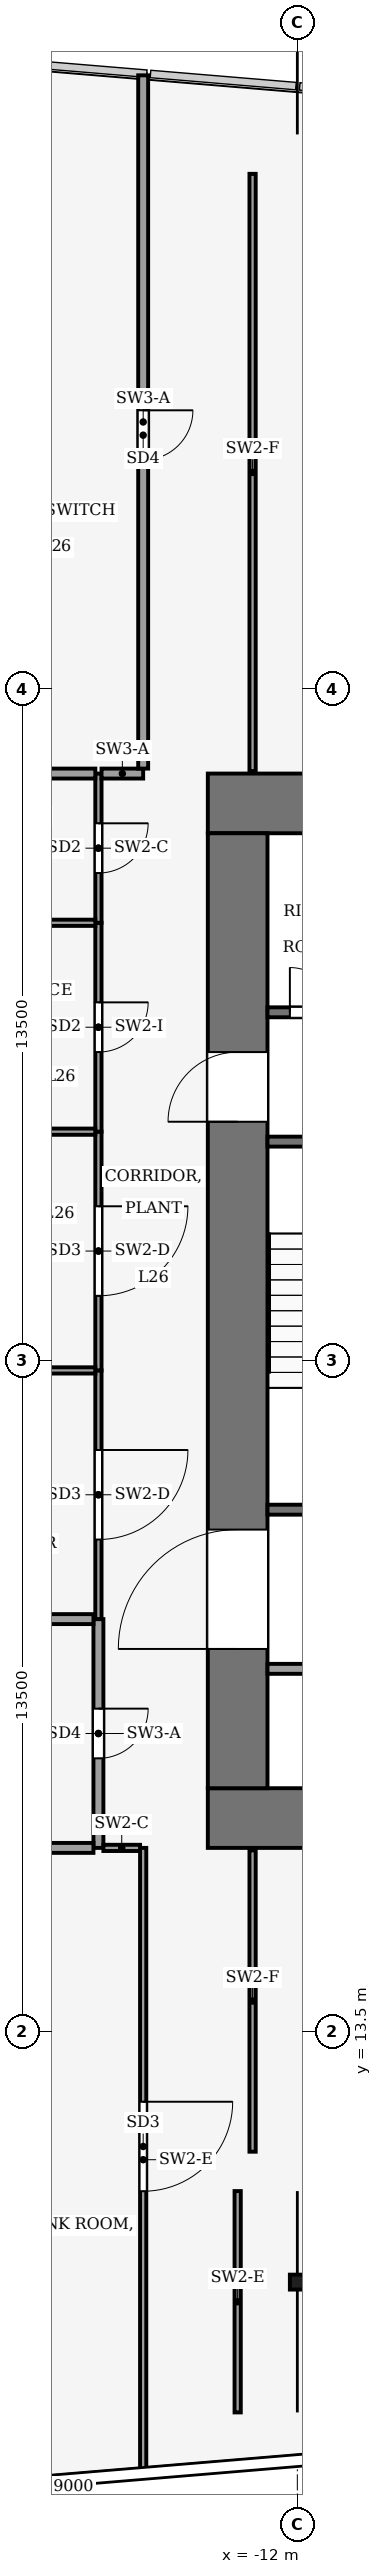
"""IFC4 building model, lengths in metres.
Left out: names, types, materials, properties, quantities, classifications, styles, units other than length and angle.
Written with IfcOpenShell. Run it as: python <this file> out.ifc"""

import sys

from ifc_helpers import new_model, si_unit, direction, frame, frame_2d, origin, origin_2d, place, context, subcontext, project, spatial, rectangle, hollow_rectangle, i_section, extrude, element, fill, save


model = new_model("IFC4")
c1 = context("Model", 3, precision=1e-05, world=origin(), true_north=direction((0.0, 1.0)))
c2 = subcontext(c1, "Body", "Model", "MODEL_VIEW")
j1 = project(units=[si_unit("LENGTHUNIT", "METRE"), si_unit("PLANEANGLEUNIT", "RADIAN")], contexts=[c1])
p1 = place(None, origin())
s1 = spatial("IfcSite", under=j1, at=p1, CompositionType="ELEMENT")
p2 = place(p1, origin())
s2 = spatial("IfcBuilding", under=s1, at=p2, CompositionType="ELEMENT")
p3 = place(p2, frame((0.0, 0.0, 114.0)))
s3 = spatial("IfcBuildingStorey", under=s2, at=p3, CompositionType="ELEMENT", Elevation=114.0)
for number, where, z_axis, x_axis in (
    (1, (-13.8, 17.8, -0.25), (0.0, 0.0, 1.0), (1.0, 0.0, 0.0)),
    (2, (-13.8, 38.2, -0.25), (0.0, 0.0, 1.0), (1.0, 0.0, 0.0)),
):
    element("IfcWall", number, at=place(p3, frame(where, z_axis=z_axis, x_axis=x_axis)), inside=s3, PredefinedType="SHEAR", context=c2, shape_type="SweptSolid", body=[
        extrude(rectangle(XDim=27.6, YDim=1.2, at=frame_2d((13.8, 0.0))), origin(), (0.0, 0.0, 1.0), 7.12),
    ])
p4 = place(p3, frame((-13.2, 18.4, -0.25), z_axis=(0.0, 0.0, 1.0), x_axis=(0.0, 1.0, 0.0)))
e3 = element("IfcWall", 3, at=p4, inside=s3, PredefinedType="SHEAR", context=c2, shape_type="SweptSolid", body=[
    extrude(rectangle(XDim=19.2, YDim=1.2, at=frame_2d((9.6, 0.0))), origin(), (0.0, 0.0, 1.0), 7.12),
])
p5 = place(p4, frame((2.8, 0.0, 0.25)))
e4 = element("IfcOpeningElement", 4, at=p5, cuts=e3, PredefinedType="OPENING", context=c2, shape_type="SweptSolid", body=[
    extrude(rectangle(XDim=2.4, YDim=2.4, at=frame_2d((1.2, 1.2))), frame((0.0, 0.61, 0.0), z_axis=(0.0, -1.0, 0.0), x_axis=(1.0, 0.0, 0.0)), (0.0, 0.0, 1.0), 1.22),
])
p6 = place(p4, frame((13.4, 0.0, 0.25)))
e5 = element("IfcOpeningElement", 5, at=p6, cuts=e3, PredefinedType="OPENING", context=c2, shape_type="SweptSolid", body=[
    extrude(rectangle(XDim=1.4, YDim=2.2, at=frame_2d((0.7, 1.1))), frame((0.0, 0.61, 0.0), z_axis=(0.0, -1.0, 0.0), x_axis=(1.0, 0.0, 0.0)), (0.0, 0.0, 1.0), 1.22),
])
p7 = place(p3, frame((-12.0, 51.65, 0.337), z_axis=(0.0, 0.786264551358, 0.617890002571), x_axis=(-1.0, 0.0, 0.0)))
e6 = element("IfcColumn", 6, at=p7, inside=s3, PredefinedType="COLUMN", context=c2, shape_type="SweptSolid", body=[
    extrude(hollow_rectangle(XDim=0.8, YDim=0.8, WallThickness=0.04, at=origin_2d()), origin(), (0.0, 0.0, 1.0), 10.238),
])
p8 = place(p3, frame((-12.0, 5.85, 0.253), z_axis=(0.0, 0.565283029437, 0.824897021834), x_axis=(-1.0, 0.0, 0.0)))
e7 = element("IfcColumn", 7, at=p8, inside=s3, PredefinedType="COLUMN", context=c2, shape_type="SweptSolid", body=[
    extrude(hollow_rectangle(XDim=0.8, YDim=0.8, WallThickness=0.04, at=origin_2d()), origin(), (0.0, 0.0, 1.0), 7.872),
])
p9 = place(p3, frame((-12.0, 8.47, 5.003), z_axis=(0.0, 0.0, 1.0), x_axis=(1.0, 0.0, 0.0)))
e8 = element("IfcColumn", 8, at=p9, inside=s3, PredefinedType="COLUMN", context=c2, shape_type="SweptSolid", body=[
    extrude(i_section(OverallWidth=0.3, OverallDepth=0.3, WebThickness=0.011, FlangeThickness=0.019, FilletRadius=0.027, at=origin_2d()), origin(), (0.0, 0.0, 1.0), 1.697),
])
p10 = place(p3, frame((-12.6, 20.8, 0.0), z_axis=(0.0, 0.0, 1.0), x_axis=(1.0, 0.0, 0.0)))
e9 = element("IfcWall", 9, at=p10, inside=s3, PredefinedType="PARTITIONING", context=c2, shape_type="SweptSolid", body=[
    extrude(rectangle(XDim=6.6, YDim=0.2, at=frame_2d((3.3, 0.0))), origin(), (0.0, 0.0, 1.0), 6.87),
])
p11 = place(p10, frame((2.8, 0.0, 0.0)))
e10 = element("IfcOpeningElement", 10, at=p11, cuts=e9, PredefinedType="OPENING", context=c2, shape_type="SweptSolid", body=[
    extrude(rectangle(XDim=1.0, YDim=2.1, at=frame_2d((0.5, 1.05))), frame((0.0, 0.11, 0.0), z_axis=(0.0, -1.0, 0.0), x_axis=(1.0, 0.0, 0.0)), (0.0, 0.0, 1.0), 0.22),
])
p12 = place(p3, frame((-12.6, 24.0, 0.0), z_axis=(0.0, 0.0, 1.0), x_axis=(1.0, 0.0, 0.0)))
e11 = element("IfcWall", 11, at=p12, inside=s3, PredefinedType="PARTITIONING", context=c2, shape_type="SweptSolid", body=[
    extrude(rectangle(XDim=6.6, YDim=0.2, at=frame_2d((3.3, 0.0))), origin(), (0.0, 0.0, 1.0), 6.87),
])
p13 = place(p12, frame((4.7, 0.0, 0.0)))
e12 = element("IfcOpeningElement", 12, at=p13, cuts=e11, PredefinedType="OPENING", context=c2, shape_type="SweptSolid", body=[
    extrude(rectangle(XDim=1.0, YDim=2.1, at=frame_2d((0.5, 1.05))), frame((0.0, 0.11, 0.0), z_axis=(0.0, -1.0, 0.0), x_axis=(1.0, 0.0, 0.0)), (0.0, 0.0, 1.0), 0.22),
])
p14 = place(p3, frame((-12.6, 31.4, 0.0), z_axis=(0.0, 0.0, 1.0), x_axis=(1.0, 0.0, 0.0)))
e13 = element("IfcWall", 13, at=p14, inside=s3, PredefinedType="PARTITIONING", context=c2, shape_type="SweptSolid", body=[
    extrude(rectangle(XDim=6.6, YDim=0.2, at=frame_2d((3.3, 0.0))), origin(), (0.0, 0.0, 1.0), 6.87),
])
p15 = place(p14, frame((1.0, 0.0, 0.0)))
e14 = element("IfcOpeningElement", 14, at=p15, cuts=e13, PredefinedType="OPENING", context=c2, shape_type="SweptSolid", body=[
    extrude(rectangle(XDim=1.2, YDim=2.2, at=frame_2d((0.6, 1.1))), frame((0.0, 0.11, 0.0), z_axis=(0.0, -1.0, 0.0), x_axis=(1.0, 0.0, 0.0)), (0.0, 0.0, 1.0), 0.22),
])
p16 = place(p3, frame((-12.6, 34.0, 0.0), z_axis=(0.0, 0.0, 1.0), x_axis=(1.0, 0.0, 0.0)))
e15 = element("IfcWall", 15, at=p16, inside=s3, PredefinedType="PARTITIONING", context=c2, shape_type="SweptSolid", body=[
    extrude(rectangle(XDim=6.6, YDim=0.2, at=frame_2d((3.3, 0.0))), origin(), (0.0, 0.0, 1.0), 6.87),
])
p17 = place(p16, frame((4.7, 0.0, 0.0)))
e16 = element("IfcOpeningElement", 16, at=p17, cuts=e15, PredefinedType="OPENING", context=c2, shape_type="SweptSolid", body=[
    extrude(rectangle(XDim=1.4, YDim=2.2, at=frame_2d((0.7, 1.1))), frame((0.0, 0.11, 0.0), z_axis=(0.0, -1.0, 0.0), x_axis=(1.0, 0.0, 0.0)), (0.0, 0.0, 1.0), 0.22),
])
p18 = place(p16, frame((2.3, 0.0, 0.0)))
e17 = element("IfcOpeningElement", 17, at=p18, cuts=e15, PredefinedType="OPENING", context=c2, shape_type="SweptSolid", body=[
    extrude(rectangle(XDim=1.4, YDim=2.2, at=frame_2d((0.7, 1.1))), frame((0.0, 0.11, 0.0), z_axis=(0.0, -1.0, 0.0), x_axis=(1.0, 0.0, 0.0)), (0.0, 0.0, 1.0), 0.22),
])
p19 = place(p16, frame((0.45, 0.0, 0.0)))
e18 = element("IfcOpeningElement", 18, at=p19, cuts=e15, PredefinedType="OPENING", context=c2, shape_type="SweptSolid", body=[
    extrude(rectangle(XDim=0.9, YDim=2.1, at=frame_2d((0.45, 1.05))), frame((0.0, 0.11, 0.0), z_axis=(0.0, -1.0, 0.0), x_axis=(1.0, 0.0, 0.0)), (0.0, 0.0, 1.0), 0.22),
])
p20 = place(p3, frame((-16.0, 21.8, 0.0), z_axis=(0.0, 0.0, 1.0), x_axis=(0.0, -1.0, 0.0)))
e19 = element("IfcWall", 19, at=p20, inside=s3, PredefinedType="PARTITIONING", context=c2, shape_type="SweptSolid", body=[
    extrude(rectangle(XDim=4.6, YDim=0.2, at=frame_2d((2.3, 0.0))), origin(), (0.0, 0.0, 1.0), 6.14),
])
p21 = place(p20, frame((1.8, 0.0, 0.0)))
e20 = element("IfcOpeningElement", 20, at=p21, cuts=e19, PredefinedType="OPENING", context=c2, shape_type="SweptSolid", body=[
    extrude(rectangle(XDim=1.0, YDim=2.1, at=frame_2d((0.5, 1.05))), frame((0.0, 0.11, 0.0), z_axis=(0.0, -1.0, 0.0), x_axis=(1.0, 0.0, 0.0)), (0.0, 0.0, 1.0), 0.22),
])
p22 = place(p3, frame((-16.0, 26.8, 0.0), z_axis=(0.0, 0.0, 1.0), x_axis=(0.0, -1.0, 0.0)))
e21 = element("IfcWall", 21, at=p22, inside=s3, PredefinedType="PARTITIONING", context=c2, shape_type="SweptSolid", body=[
    extrude(rectangle(XDim=5.0, YDim=0.125, at=frame_2d((2.5, 0.0))), origin(), (0.0, 0.0, 1.0), 6.44),
])
p23 = place(p22, frame((1.6, 0.0, 0.0)))
e22 = element("IfcOpeningElement", 22, at=p23, cuts=e21, PredefinedType="OPENING", context=c2, shape_type="SweptSolid", body=[
    extrude(rectangle(XDim=1.8, YDim=2.4, at=frame_2d((0.9, 1.2))), frame((0.0, 0.073, 0.0), z_axis=(0.0, -1.0, 0.0), x_axis=(1.0, 0.0, 0.0)), (0.0, 0.0, 1.0), 0.145),
])
p24 = place(p3, frame((-16.0, 31.6, 0.0), z_axis=(0.0, 0.0, 1.0), x_axis=(0.0, -1.0, 0.0)))
e23 = element("IfcWall", 23, at=p24, inside=s3, PredefinedType="PARTITIONING", context=c2, shape_type="SweptSolid", body=[
    extrude(rectangle(XDim=4.8, YDim=0.125, at=frame_2d((2.4, 0.0))), origin(), (0.0, 0.0, 1.0), 6.44),
])
p25 = place(p24, frame((1.5, 0.0, 0.0)))
e24 = element("IfcOpeningElement", 24, at=p25, cuts=e23, PredefinedType="OPENING", context=c2, shape_type="SweptSolid", body=[
    extrude(rectangle(XDim=1.8, YDim=2.4, at=frame_2d((0.9, 1.2))), frame((0.0, 0.073, 0.0), z_axis=(0.0, -1.0, 0.0), x_axis=(1.0, 0.0, 0.0)), (0.0, 0.0, 1.0), 0.145),
])
p26 = place(p3, frame((-16.0, 35.8, 0.0), z_axis=(0.0, 0.0, 1.0), x_axis=(0.0, -1.0, 0.0)))
e25 = element("IfcWall", 25, at=p26, inside=s3, PredefinedType="PARTITIONING", context=c2, shape_type="SweptSolid", body=[
    extrude(rectangle(XDim=4.2, YDim=0.125, at=frame_2d((2.1, 0.0))), origin(), (0.0, 0.0, 1.0), 6.48),
])
p27 = place(p26, frame((1.6, 0.0, 0.0)))
e26 = element("IfcOpeningElement", 26, at=p27, cuts=e25, PredefinedType="OPENING", context=c2, shape_type="SweptSolid", body=[
    extrude(rectangle(XDim=1.0, YDim=2.1, at=frame_2d((0.5, 1.05))), frame((0.0, 0.073, 0.0), z_axis=(0.0, -1.0, 0.0), x_axis=(1.0, 0.0, 0.0)), (0.0, 0.0, 1.0), 0.145),
])
p28 = place(p3, frame((-16.0, 38.8, 0.0), z_axis=(0.0, 0.0, 1.0), x_axis=(0.0, -1.0, 0.0)))
e27 = element("IfcWall", 27, at=p28, inside=s3, PredefinedType="PARTITIONING", context=c2, shape_type="SweptSolid", body=[
    extrude(rectangle(XDim=3.0, YDim=0.125, at=frame_2d((1.5, 0.0))), origin(), (0.0, 0.0, 1.0), 6.14),
])
p29 = place(p28, frame((1.0, 0.0, 0.0)))
e28 = element("IfcOpeningElement", 28, at=p29, cuts=e27, PredefinedType="OPENING", context=c2, shape_type="SweptSolid", body=[
    extrude(rectangle(XDim=1.0, YDim=2.1, at=frame_2d((0.5, 1.05))), frame((0.0, 0.073, 0.0), z_axis=(0.0, -1.0, 0.0), x_axis=(1.0, 0.0, 0.0)), (0.0, 0.0, 1.0), 0.145),
])
p30 = place(p3, frame((-15.1, 17.2, 0.0), z_axis=(0.0, 0.0, 1.0), x_axis=(0.0, -1.0, 0.0)))
e29 = element("IfcWall", 29, at=p30, inside=s3, PredefinedType="PARTITIONING", context=c2, shape_type="SweptSolid", body=[
    extrude(rectangle(XDim=12.538, YDim=0.125, at=frame_2d((6.269, 0.0))), origin(), (0.0, 0.0, 1.0), 6.04),
])
p31 = place(p30, frame((5.104, 0.0, 0.0)))
e30 = element("IfcOpeningElement", 30, at=p31, cuts=e29, PredefinedType="OPENING", context=c2, shape_type="SweptSolid", body=[
    extrude(rectangle(XDim=1.8, YDim=2.4, at=frame_2d((0.9, 1.2))), frame((0.0, 0.073, 0.0), z_axis=(0.0, -1.0, 0.0), x_axis=(1.0, 0.0, 0.0)), (0.0, 0.0, 1.0), 0.145),
])
p32 = place(p3, frame((-15.163, 17.2, 0.0), z_axis=(0.0, 0.0, 1.0), x_axis=(-1.0, 0.0, 0.0)))
e31 = element("IfcWall", 31, at=p32, inside=s3, PredefinedType="PARTITIONING", context=c2, shape_type="SweptSolid", body=[
    extrude(rectangle(XDim=0.737, YDim=0.125, at=frame_2d((0.369, 0.0))), origin(), (0.0, 0.0, 1.0), 6.14),
])
p33 = place(p3, frame((-15.938, 38.8, 0.0), z_axis=(0.0, 0.0, 1.0), x_axis=(1.0, 0.0, 0.0)))
e32 = element("IfcWall", 32, at=p33, inside=s3, PredefinedType="PARTITIONING", context=c2, shape_type="SweptSolid", body=[
    extrude(rectangle(XDim=0.837, YDim=0.2, at=frame_2d((0.419, 0.0))), origin(), (0.0, 0.0, 1.0), 6.14),
])
p34 = place(p3, frame((-15.1, 52.838, 0.0), z_axis=(0.0, 0.0, 1.0), x_axis=(0.0, -1.0, 0.0)))
e33 = element("IfcWall", 33, at=p34, inside=s3, PredefinedType="PARTITIONING", context=c2, shape_type="SweptSolid", body=[
    extrude(rectangle(XDim=13.938, YDim=0.2, at=frame_2d((6.969, 0.0))), origin(), (0.0, 0.0, 1.0), 6.14),
])
p35 = place(p34, frame((6.735, 0.0, 0.0)))
e34 = element("IfcOpeningElement", 34, at=p35, cuts=e33, PredefinedType="OPENING", context=c2, shape_type="SweptSolid", body=[
    extrude(rectangle(XDim=1.0, YDim=2.1, at=frame_2d((0.5, 1.05))), frame((0.0, 0.11, 0.0), z_axis=(0.0, -1.0, 0.0), x_axis=(1.0, 0.0, 0.0)), (0.0, 0.0, 1.0), 0.22),
])
p36 = place(p3, frame((-19.9, 21.8, 0.0), z_axis=(0.0, 0.0, 1.0), x_axis=(1.0, 0.0, 0.0)))
e35 = element("IfcWall", 35, at=p36, inside=s3, PredefinedType="PARTITIONING", context=c2, shape_type="SweptSolid", body=[
    extrude(rectangle(XDim=3.8, YDim=0.2, at=frame_2d((1.9, 0.0))), origin(), (0.0, 0.0, 1.0), 6.87),
])
p37 = place(p3, frame((-16.1, 17.2, 0.0), z_axis=(0.0, 0.0, 1.0), x_axis=(-1.0, 0.0, 0.0)))
e36 = element("IfcWall", 36, at=p37, inside=s3, PredefinedType="PARTITIONING", context=c2, shape_type="SweptSolid", body=[
    extrude(rectangle(XDim=3.8, YDim=0.2, at=frame_2d((1.9, 0.0))), origin(), (0.0, 0.0, 1.0), 6.14),
])
p38 = place(p3, frame((-19.9, 26.8, 0.0), z_axis=(0.0, 0.0, 1.0), x_axis=(1.0, 0.0, 0.0)))
e37 = element("IfcWall", 37, at=p38, inside=s3, PredefinedType="PARTITIONING", context=c2, shape_type="SweptSolid", body=[
    extrude(rectangle(XDim=3.837, YDim=0.125, at=frame_2d((1.919, 0.0))), origin(), (0.0, 0.0, 1.0), 6.87),
])
p39 = place(p3, frame((-19.8, 31.6, 0.0), z_axis=(0.0, 0.0, 1.0), x_axis=(1.0, 0.0, 0.0)))
e38 = element("IfcWall", 38, at=p39, inside=s3, PredefinedType="PARTITIONING", context=c2, shape_type="SweptSolid", body=[
    extrude(rectangle(XDim=3.738, YDim=0.125, at=frame_2d((1.869, 0.0))), origin(), (0.0, 0.0, 1.0), 6.87),
])
p40 = place(p3, frame((-19.9, 35.8, 0.0), z_axis=(0.0, 0.0, 1.0), x_axis=(1.0, 0.0, 0.0)))
e39 = element("IfcWall", 39, at=p40, inside=s3, PredefinedType="PARTITIONING", context=c2, shape_type="SweptSolid", body=[
    extrude(rectangle(XDim=3.837, YDim=0.125, at=frame_2d((1.919, 0.0))), origin(), (0.0, 0.0, 1.0), 6.87),
])
p41 = place(p3, frame((-19.9, 38.8, 0.0), z_axis=(0.0, 0.0, 1.0), x_axis=(1.0, 0.0, 0.0)))
e40 = element("IfcWall", 40, at=p41, inside=s3, PredefinedType="PARTITIONING", context=c2, shape_type="SweptSolid", body=[
    extrude(rectangle(XDim=3.837, YDim=0.2, at=frame_2d((1.919, 0.0))), origin(), (0.0, 0.0, 1.0), 6.14),
])
p42 = place(p3, frame((-12.9, 50.858, 0.0), z_axis=(0.0, 0.0, 1.0), x_axis=(0.0, -1.0, 0.0)))
e41 = element("IfcWall", 41, at=p42, inside=s3, PredefinedType="PARTITIONING", context=c2, shape_type="SweptSolid", body=[
    extrude(rectangle(XDim=12.008, YDim=0.125, at=frame_2d((6.004, 0.0))), origin(), (0.0, 0.0, 1.0), 6.87),
])
p43 = place(p3, frame((-12.9, 17.15, 0.0), z_axis=(0.0, 0.0, 1.0), x_axis=(0.0, -1.0, 0.0)))
e42 = element("IfcWall", 42, at=p43, inside=s3, PredefinedType="PARTITIONING", context=c2, shape_type="SweptSolid", body=[
    extrude(rectangle(XDim=6.058, YDim=0.125, at=frame_2d((3.029, 0.0))), origin(), (0.0, 0.0, 1.0), 6.87),
])
p44 = place(p3, frame((-13.2, 10.3, 0.0), z_axis=(0.0, 0.0, 1.0), x_axis=(0.0, -1.0, 0.0)))
e43 = element("IfcWall", 43, at=p44, inside=s3, PredefinedType="PARTITIONING", context=c2, shape_type="SweptSolid", body=[
    extrude(rectangle(XDim=4.45, YDim=0.125, at=frame_2d((2.225, 0.0))), origin(), (0.0, 0.0, 1.0), 6.04),
])
p45 = place(p19, origin())
e44 = element("IfcDoor", 44, at=p45, inside=s3, OperationType="SINGLE_SWING_RIGHT", PredefinedType="DOOR", context=c2, shape_type="SweptSolid", body=[
    extrude(rectangle(XDim=0.9, YDim=2.1, at=frame_2d((0.45, 1.05))), frame((0.0, 0.025, 0.0), z_axis=(0.0, -1.0, 0.0), x_axis=(1.0, 0.0, 0.0)), (0.0, 0.0, 1.0), 0.05),
])
fill(e18, e44)
p46 = place(p5, origin())
e45 = element("IfcDoor", 45, at=p46, inside=s3, OperationType="DOUBLE_DOOR_SINGLE_SWING", PredefinedType="DOOR", context=c2, shape_type="SweptSolid", body=[
    extrude(rectangle(XDim=2.4, YDim=2.4, at=frame_2d((1.2, 1.2))), frame((0.0, 0.025, 0.0), z_axis=(0.0, -1.0, 0.0), x_axis=(1.0, 0.0, 0.0)), (0.0, 0.0, 1.0), 0.05),
])
fill(e4, e45)
p47 = place(p6, origin())
e46 = element("IfcDoor", 46, at=p47, inside=s3, OperationType="SINGLE_SWING_RIGHT", PredefinedType="DOOR", context=c2, shape_type="SweptSolid", body=[
    extrude(rectangle(XDim=1.4, YDim=2.2, at=frame_2d((0.7, 1.1))), frame((0.0, 0.025, 0.0), z_axis=(0.0, -1.0, 0.0), x_axis=(1.0, 0.0, 0.0)), (0.0, 0.0, 1.0), 0.05),
])
fill(e5, e46)
p48 = place(p21, origin())
e47 = element("IfcDoor", 47, at=p48, inside=s3, OperationType="SINGLE_SWING_RIGHT", PredefinedType="DOOR", context=c2, shape_type="SweptSolid", body=[
    extrude(rectangle(XDim=1.0, YDim=2.1, at=frame_2d((0.5, 1.05))), frame((0.0, 0.025, 0.0), z_axis=(0.0, -1.0, 0.0), x_axis=(1.0, 0.0, 0.0)), (0.0, 0.0, 1.0), 0.05),
])
fill(e20, e47)
p49 = place(p23, origin())
e48 = element("IfcDoor", 48, at=p49, inside=s3, OperationType="DOUBLE_DOOR_SINGLE_SWING", PredefinedType="DOOR", context=c2, shape_type="SweptSolid", body=[
    extrude(rectangle(XDim=1.8, YDim=2.4, at=frame_2d((0.9, 1.2))), frame((0.0, 0.025, 0.0), z_axis=(0.0, -1.0, 0.0), x_axis=(1.0, 0.0, 0.0)), (0.0, 0.0, 1.0), 0.05),
])
fill(e22, e48)
p50 = place(p25, origin())
e49 = element("IfcDoor", 49, at=p50, inside=s3, OperationType="DOUBLE_DOOR_SINGLE_SWING", PredefinedType="DOOR", context=c2, shape_type="SweptSolid", body=[
    extrude(rectangle(XDim=1.8, YDim=2.4, at=frame_2d((0.9, 1.2))), frame((0.0, 0.025, 0.0), z_axis=(0.0, -1.0, 0.0), x_axis=(1.0, 0.0, 0.0)), (0.0, 0.0, 1.0), 0.05),
])
fill(e24, e49)
p51 = place(p27, origin())
e50 = element("IfcDoor", 50, at=p51, inside=s3, OperationType="SINGLE_SWING_LEFT", PredefinedType="DOOR", context=c2, shape_type="SweptSolid", body=[
    extrude(rectangle(XDim=1.0, YDim=2.1, at=frame_2d((0.5, 1.05))), frame((0.0, 0.025, 0.0), z_axis=(0.0, -1.0, 0.0), x_axis=(1.0, 0.0, 0.0)), (0.0, 0.0, 1.0), 0.05),
])
fill(e26, e50)
p52 = place(p29, origin())
e51 = element("IfcDoor", 51, at=p52, inside=s3, OperationType="SINGLE_SWING_RIGHT", PredefinedType="DOOR", context=c2, shape_type="SweptSolid", body=[
    extrude(rectangle(XDim=1.0, YDim=2.1, at=frame_2d((0.5, 1.05))), frame((0.0, 0.025, 0.0), z_axis=(0.0, -1.0, 0.0), x_axis=(1.0, 0.0, 0.0)), (0.0, 0.0, 1.0), 0.05),
])
fill(e28, e51)
p53 = place(p31, origin())
e52 = element("IfcDoor", 52, at=p53, inside=s3, OperationType="DOUBLE_DOOR_SINGLE_SWING", PredefinedType="DOOR", context=c2, shape_type="SweptSolid", body=[
    extrude(rectangle(XDim=1.8, YDim=2.4, at=frame_2d((0.9, 1.2))), frame((0.0, 0.025, 0.0), z_axis=(0.0, -1.0, 0.0), x_axis=(1.0, 0.0, 0.0)), (0.0, 0.0, 1.0), 0.05),
])
fill(e30, e52)
p54 = place(p35, origin())
e53 = element("IfcDoor", 53, at=p54, inside=s3, OperationType="SINGLE_SWING_RIGHT", PredefinedType="DOOR", context=c2, shape_type="SweptSolid", body=[
    extrude(rectangle(XDim=1.0, YDim=2.1, at=frame_2d((0.5, 1.05))), frame((0.0, 0.025, 0.0), z_axis=(0.0, -1.0, 0.0), x_axis=(1.0, 0.0, 0.0)), (0.0, 0.0, 1.0), 0.05),
])
fill(e34, e53)
save(model, sys.argv[1])
